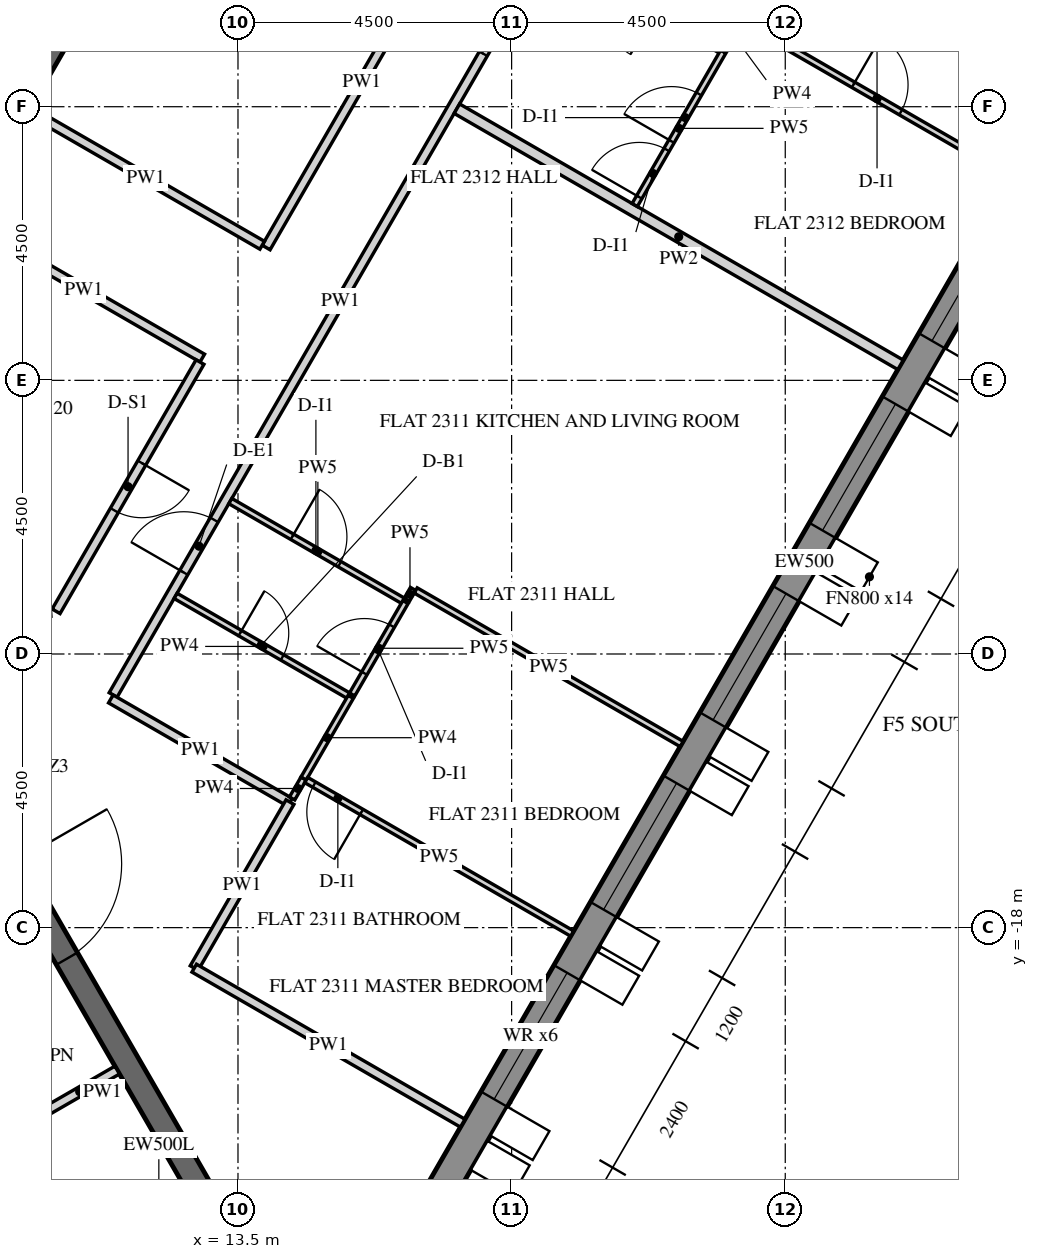
"""IFC4 building model, lengths in metres.
Left out: names, types, materials, properties, quantities, classifications, styles, units other than length and angle.
Written with IfcOpenShell. Run it as: python <this file> out.ifc"""

import sys

from ifc_helpers import new_model, si_unit, direction, frame, frame_2d, origin, place, context, subcontext, project, spatial, polyline, rectangle, outline, extrude, element, fill, save


model = new_model("IFC4")
c1 = context("Model", 3, precision=1e-05, world=origin(), true_north=direction((0.0, 1.0)))
c2 = subcontext(c1, "Body", "Model", "MODEL_VIEW")
j1 = project(units=[si_unit("LENGTHUNIT", "METRE"), si_unit("PLANEANGLEUNIT", "RADIAN")], contexts=[c1])
p1 = place(None, origin())
s1 = spatial("IfcSite", under=j1, at=p1, CompositionType="ELEMENT")
p2 = place(p1, origin())
s2 = spatial("IfcBuilding", under=s1, at=p2, CompositionType="ELEMENT")
p3 = place(p2, frame((0.0, 0.0, 291.3)))
s3 = spatial("IfcBuildingStorey", under=s2, at=p3, CompositionType="ELEMENT", Elevation=291.3)
p4 = place(p3, frame((16.451, -23.005, -0.15), z_axis=(0.0, 0.0, 1.0), x_axis=(0.500003737743, 0.866023245787, 0.0)))
e1 = element("IfcWall", 1, at=p4, inside=s3, PredefinedType="SOLIDWALL", context=c2, shape_type="SweptSolid", body=[
    extrude(outline(polyline([(-0.021, -0.25), (25.468, -0.25), (25.421, 0.25), (0.021, 0.25), (-0.021, -0.25)])), origin(), (0.0, 0.0, 1.0), 3.9),
])
p5 = place(p4, frame((2.522, 0.0, 0.75)))
e2 = element("IfcOpeningElement", 2, at=p5, cuts=e1, PredefinedType="OPENING", context=c2, shape_type="SweptSolid", body=[
    extrude(rectangle(XDim=2.4, YDim=2.7, at=frame_2d((1.2, 1.35))), frame((0.0, 0.26, 0.0), z_axis=(0.0, -1.0, 0.0), x_axis=(1.0, 0.0, 0.0)), (0.0, 0.0, 1.0), 0.52),
])
p6 = place(p4, frame((6.122, 0.0, 0.75)))
e3 = element("IfcOpeningElement", 3, at=p6, cuts=e1, PredefinedType="OPENING", context=c2, shape_type="SweptSolid", body=[
    extrude(rectangle(XDim=2.4, YDim=2.7, at=frame_2d((1.2, 1.35))), frame((0.0, 0.26, 0.0), z_axis=(0.0, -1.0, 0.0), x_axis=(1.0, 0.0, 0.0)), (0.0, 0.0, 1.0), 0.52),
])
p7 = place(p4, frame((9.722, 0.0, 0.75)))
e4 = element("IfcOpeningElement", 4, at=p7, cuts=e1, PredefinedType="OPENING", context=c2, shape_type="SweptSolid", body=[
    extrude(rectangle(XDim=2.4, YDim=2.7, at=frame_2d((1.2, 1.35))), frame((0.0, 0.26, 0.0), z_axis=(0.0, -1.0, 0.0), x_axis=(1.0, 0.0, 0.0)), (0.0, 0.0, 1.0), 0.52),
])
p8 = place(p4, frame((13.323, 0.0, 0.75)))
e5 = element("IfcOpeningElement", 5, at=p8, cuts=e1, PredefinedType="OPENING", context=c2, shape_type="SweptSolid", body=[
    extrude(rectangle(XDim=2.4, YDim=2.7, at=frame_2d((1.2, 1.35))), frame((0.0, 0.26, 0.0), z_axis=(0.0, -1.0, 0.0), x_axis=(1.0, 0.0, 0.0)), (0.0, 0.0, 1.0), 0.52),
])
p9 = place(p4, frame((16.922, 0.0, 0.75)))
e6 = element("IfcOpeningElement", 6, at=p9, cuts=e1, PredefinedType="OPENING", context=c2, shape_type="SweptSolid", body=[
    extrude(rectangle(XDim=2.4, YDim=2.7, at=frame_2d((1.2, 1.35))), frame((0.0, 0.26, 0.0), z_axis=(0.0, -1.0, 0.0), x_axis=(1.0, 0.0, 0.0)), (0.0, 0.0, 1.0), 0.52),
])
p10 = place(p4, frame((20.522, 0.0, 0.75)))
e7 = element("IfcOpeningElement", 7, at=p10, cuts=e1, PredefinedType="OPENING", context=c2, shape_type="SweptSolid", body=[
    extrude(rectangle(XDim=2.4, YDim=2.7, at=frame_2d((1.2, 1.35))), frame((0.0, 0.26, 0.0), z_axis=(0.0, -1.0, 0.0), x_axis=(1.0, 0.0, 0.0)), (0.0, 0.0, 1.0), 0.52),
])
p11 = place(p3, frame((6.235, -10.8, -0.15), z_axis=(0.0, 0.0, 1.0), x_axis=(0.499996419489, 0.866027470984, 0.0)))
e8 = element("IfcWall", 8, at=p11, inside=s3, PredefinedType="SHEAR", context=c2, shape_type="SweptSolid", body=[
    extrude(outline(polyline([(-0.115, -0.2), (12.586, -0.2), (12.355, 0.2), (0.115, 0.2), (-0.115, -0.2)])), origin(), (0.0, 0.0, 1.0), 3.9),
])
p12 = place(p11, frame((5.364, 0.0, 0.15)))
e9 = element("IfcOpeningElement", 9, at=p12, cuts=e8, PredefinedType="OPENING", context=c2, shape_type="SweptSolid", body=[
    extrude(rectangle(XDim=1.8, YDim=2.4, at=frame_2d((0.9, 1.2))), frame((0.0, 0.21, 0.0), z_axis=(0.0, -1.0, 0.0), x_axis=(1.0, 0.0, 0.0)), (0.0, 0.0, 1.0), 0.42),
])
p13 = place(p3, frame((6.351, -11.0, -0.15), z_axis=(0.0, 0.0, 1.0), x_axis=(0.499998894578, -0.866026041999, 0.0)))
e10 = element("IfcWall", 10, at=p13, inside=s3, PredefinedType="SHEAR", context=c2, shape_type="SweptSolid", body=[
    extrude(rectangle(XDim=15.544, YDim=0.4, at=frame_2d((7.772, 0.0))), origin(), (0.0, 0.0, 1.0), 3.9),
])
p14 = place(p13, frame((6.872, 0.0, 0.15)))
e11 = element("IfcOpeningElement", 11, at=p14, cuts=e10, PredefinedType="OPENING", context=c2, shape_type="SweptSolid", body=[
    extrude(rectangle(XDim=1.8, YDim=2.4, at=frame_2d((0.9, 1.2))), frame((0.0, 0.21, 0.0), z_axis=(0.0, -1.0, 0.0), x_axis=(1.0, 0.0, 0.0)), (0.0, 0.0, 1.0), 0.42),
])
p15 = place(p3, frame((10.28, -21.055, 0.0), z_axis=(0.0, 0.0, 1.0), x_axis=(0.866020080793, 0.500009219579, 0.0)))
e12 = element("IfcWall", 12, at=p15, inside=s3, PredefinedType="PARTITIONING", context=c2, shape_type="SweptSolid", body=[
    extrude(rectangle(XDim=1.425, YDim=0.15, at=frame_2d((0.712, 0.0))), origin(), (0.0, 0.0, 1.0), 2.988),
])
p16 = place(p3, frame((11.447, -14.174, 0.0), z_axis=(0.0, 0.0, 1.0), x_axis=(0.500003306199, 0.866023494941, 0.0)))
e13 = element("IfcWall", 13, at=p16, inside=s3, PredefinedType="PARTITIONING", context=c2, shape_type="SweptSolid", body=[
    extrude(rectangle(XDim=14.949, YDim=0.15, at=frame_2d((7.475, 0.0))), origin(), (0.0, 0.0, 1.0), 2.988),
])
p17 = place(p16, frame((2.325, 0.0, 0.0)))
e14 = element("IfcOpeningElement", 14, at=p17, cuts=e13, PredefinedType="OPENING", context=c2, shape_type="SweptSolid", body=[
    extrude(rectangle(XDim=1.0, YDim=2.1, at=frame_2d((0.5, 1.05))), frame((0.0, 0.085, 0.0), z_axis=(0.0, -1.0, 0.0), x_axis=(1.0, 0.0, 0.0)), (0.0, 0.0, 1.0), 0.17),
])
p18 = place(p16, frame((12.177, 0.0, 0.0)))
e15 = element("IfcOpeningElement", 15, at=p18, cuts=e13, PredefinedType="OPENING", context=c2, shape_type="SweptSolid", body=[
    extrude(rectangle(XDim=1.0, YDim=2.1, at=frame_2d((0.5, 1.05))), frame((0.0, 0.085, 0.0), z_axis=(0.0, -1.0, 0.0), x_axis=(1.0, 0.0, 0.0)), (0.0, 0.0, 1.0), 0.17),
])
p19 = place(p3, frame((14.354, -15.939, 0.0), z_axis=(0.0, 0.0, 1.0), x_axis=(-0.866020560687, 0.500008388397, 0.0)))
e16 = element("IfcWall", 16, at=p19, inside=s3, PredefinedType="PARTITIONING", context=c2, shape_type="SweptSolid", body=[
    extrude(rectangle(XDim=3.4, YDim=0.15, at=frame_2d((1.7, 0.0))), origin(), (0.0, 0.0, 1.0), 2.988),
])
p20 = place(p3, frame((12.78, -18.665, 0.0), z_axis=(0.0, 0.0, 1.0), x_axis=(0.499972881236, 0.866041060244, 0.0)))
e17 = element("IfcWall", 17, at=p20, inside=s3, PredefinedType="PARTITIONING", context=c2, shape_type="SweptSolid", body=[
    extrude(rectangle(XDim=3.151, YDim=0.15, at=frame_2d((1.575, 0.0))), origin(), (0.0, 0.0, 1.0), 2.988),
])
p21 = place(p3, frame((17.196, -21.216, 0.0), z_axis=(0.0, 0.0, 1.0), x_axis=(-0.866024511559, 0.500001545377, 0.0)))
e18 = element("IfcWall", 18, at=p21, inside=s3, PredefinedType="PARTITIONING", context=c2, shape_type="SweptSolid", body=[
    extrude(rectangle(XDim=5.099, YDim=0.15, at=frame_2d((2.549, 0.0))), origin(), (0.0, 0.0, 1.0), 2.988),
])
p22 = place(p3, frame((17.112, -1.362, 0.0), z_axis=(0.0, 0.0, 1.0), x_axis=(-0.49999985423, -0.866025487945, 0.0)))
e19 = element("IfcWall", 19, at=p22, inside=s3, PredefinedType="PARTITIONING", context=c2, shape_type="SweptSolid", body=[
    extrude(rectangle(XDim=6.298, YDim=0.15, at=frame_2d((3.149, 0.0))), origin(), (0.0, 0.0, 1.0), 2.988),
])
p23 = place(p3, frame((13.898, -6.778, 0.0), z_axis=(0.0, 0.0, 1.0), x_axis=(-0.866041342403, 0.499972392486, 0.0)))
e20 = element("IfcWall", 20, at=p23, inside=s3, PredefinedType="PARTITIONING", context=c2, shape_type="SweptSolid", body=[
    extrude(rectangle(XDim=4.425, YDim=0.15, at=frame_2d((2.212, 0.0))), origin(), (0.0, 0.0, 1.0), 2.988),
])
p24 = place(p3, frame((9.016, -6.384, 0.0), z_axis=(0.0, 0.0, 1.0), x_axis=(0.866031096941, -0.499990139034, 0.0)))
e21 = element("IfcWall", 21, at=p24, inside=s3, PredefinedType="PARTITIONING", context=c2, shape_type="SweptSolid", body=[
    extrude(rectangle(XDim=4.5, YDim=0.15, at=frame_2d((2.25, 0.0))), origin(), (0.0, 0.0, 1.0), 2.988),
])
p25 = place(p3, frame((12.875, -8.699, 0.0), z_axis=(0.0, 0.0, 1.0), x_axis=(-0.49999482868, -0.866028389427, 0.0)))
e22 = element("IfcWall", 22, at=p25, inside=s3, PredefinedType="PARTITIONING", context=c2, shape_type="SweptSolid", body=[
    extrude(rectangle(XDim=4.733, YDim=0.15, at=frame_2d((2.366, 0.0))), origin(), (0.0, 0.0, 1.0), 2.988),
])
p26 = place(p25, frame((1.917, 0.0, 0.0)))
e23 = element("IfcOpeningElement", 23, at=p26, cuts=e22, PredefinedType="OPENING", context=c2, shape_type="SweptSolid", body=[
    extrude(rectangle(XDim=0.9, YDim=2.1, at=frame_2d((0.45, 1.05))), frame((0.0, 0.085, 0.0), z_axis=(0.0, -1.0, 0.0), x_axis=(1.0, 0.0, 0.0)), (0.0, 0.0, 1.0), 0.17),
])
p27 = place(p3, frame((13.374, -10.985, 0.0), z_axis=(0.0, 0.0, 1.0), x_axis=(0.866020521143, -0.500008456887, 0.0)))
e24 = element("IfcWall", 24, at=p27, inside=s3, PredefinedType="PARTITIONING", context=c2, shape_type="SweptSolid", body=[
    extrude(rectangle(XDim=3.325, YDim=0.1, at=frame_2d((1.663, 0.0))), origin(), (0.0, 0.0, 1.0), 2.988),
])
p28 = place(p27, frame((1.175, 0.0, 0.0)))
e25 = element("IfcOpeningElement", 25, at=p28, cuts=e24, PredefinedType="OPENING", context=c2, shape_type="SweptSolid", body=[
    extrude(rectangle(XDim=0.9, YDim=2.1, at=frame_2d((0.45, 1.05))), frame((0.0, 0.06, 0.0), z_axis=(0.0, -1.0, 0.0), x_axis=(1.0, 0.0, 0.0)), (0.0, 0.0, 1.0), 0.12),
])
p29 = place(p3, frame((16.278, -12.606, 0.0), z_axis=(0.0, 0.0, 1.0), x_axis=(0.500137716533, 0.865945878506, 0.0)))
e26 = element("IfcWall", 26, at=p29, inside=s3, PredefinedType="PARTITIONING", context=c2, shape_type="SweptSolid", body=[
    extrude(rectangle(XDim=0.204, YDim=0.1, at=frame_2d((0.102, 0.0))), origin(), (0.0, 0.0, 1.0), 2.988),
])
p30 = place(p3, frame((16.423, -12.455, 0.0), z_axis=(0.0, 0.0, 1.0), x_axis=(0.866018134068, -0.500012591307, 0.0)))
e27 = element("IfcWall", 27, at=p30, inside=s3, PredefinedType="PARTITIONING", context=c2, shape_type="SweptSolid", body=[
    extrude(rectangle(XDim=5.05, YDim=0.1, at=frame_2d((2.525, 0.0))), origin(), (0.0, 0.0, 1.0), 2.988),
])
p31 = place(p3, frame((24.396, -8.745, 0.0), z_axis=(0.0, 0.0, 1.0), x_axis=(-0.866014270972, 0.500019282102, 0.0)))
e28 = element("IfcWall", 28, at=p31, inside=s3, PredefinedType="PARTITIONING", context=c2, shape_type="SweptSolid", body=[
    extrude(rectangle(XDim=8.425, YDim=0.18, at=frame_2d((4.212, 0.0))), origin(), (0.0, 0.0, 1.0), 2.988),
])
p32 = place(p3, frame((12.474, -12.544, 0.0), z_axis=(0.0, 0.0, 1.0), x_axis=(0.866002163101, -0.500040251884, 0.0)))
e29 = element("IfcWall", 29, at=p32, inside=s3, PredefinedType="PARTITIONING", context=c2, shape_type="SweptSolid", body=[
    extrude(rectangle(XDim=3.325, YDim=0.1, at=frame_2d((1.663, 0.0))), origin(), (0.0, 0.0, 1.0), 2.988),
])
p33 = place(p32, frame((1.225, 0.0, 0.0)))
e30 = element("IfcOpeningElement", 30, at=p33, cuts=e29, PredefinedType="OPENING", context=c2, shape_type="SweptSolid", body=[
    extrude(rectangle(XDim=0.8, YDim=2.1, at=frame_2d((0.4, 1.05))), frame((0.0, 0.06, 0.0), z_axis=(0.0, -1.0, 0.0), x_axis=(1.0, 0.0, 0.0)), (0.0, 0.0, 1.0), 0.12),
])
p34 = place(p3, frame((15.378, -14.165, 0.0), z_axis=(0.0, 0.0, 1.0), x_axis=(0.499971461383, 0.866041879935, 0.0)))
e31 = element("IfcWall", 31, at=p34, inside=s3, PredefinedType="PARTITIONING", context=c2, shape_type="SweptSolid", body=[
    extrude(rectangle(XDim=1.754, YDim=0.1, at=frame_2d((0.877, 0.0))), origin(), (0.0, 0.0, 1.0), 2.988),
])
p35 = place(p34, frame((0.402, 0.0, 0.0)))
e32 = element("IfcOpeningElement", 32, at=p35, cuts=e31, PredefinedType="OPENING", context=c2, shape_type="SweptSolid", body=[
    extrude(rectangle(XDim=0.9, YDim=2.1, at=frame_2d((0.45, 1.05))), frame((0.0, 0.06, 0.0), z_axis=(0.0, -1.0, 0.0), x_axis=(1.0, 0.0, 0.0)), (0.0, 0.0, 1.0), 0.12),
])
p36 = place(p3, frame((14.39, -15.875, 0.0), z_axis=(0.0, 0.0, 1.0), x_axis=(0.500094824054, 0.865970650169, 0.0)))
e33 = element("IfcWall", 33, at=p36, inside=s3, PredefinedType="PARTITIONING", context=c2, shape_type="SweptSolid", body=[
    extrude(rectangle(XDim=0.378, YDim=0.1, at=frame_2d((0.189, 0.0))), origin(), (0.0, 0.0, 1.0), 2.988),
])
p37 = place(p3, frame((14.579, -15.548, 0.0), z_axis=(0.0, 0.0, 1.0), x_axis=(0.499949632511, 0.866054481515, 0.0)))
e34 = element("IfcWall", 34, at=p37, inside=s3, PredefinedType="PARTITIONING", context=c2, shape_type="SweptSolid", body=[
    extrude(rectangle(XDim=1.551, YDim=0.1, at=frame_2d((0.775, 0.0))), origin(), (0.0, 0.0, 1.0), 2.988),
])
p38 = place(p3, frame((18.996, -18.098, 0.0), z_axis=(0.0, 0.0, 1.0), x_axis=(-0.866039067339, 0.499976333282, 0.0)))
e35 = element("IfcWall", 35, at=p38, inside=s3, PredefinedType="PARTITIONING", context=c2, shape_type="SweptSolid", body=[
    extrude(rectangle(XDim=5.05, YDim=0.1, at=frame_2d((2.525, 0.0))), origin(), (0.0, 0.0, 1.0), 2.988),
])
p39 = place(p38, frame((4.0, 0.0, 0.0)))
e36 = element("IfcOpeningElement", 36, at=p39, cuts=e35, PredefinedType="OPENING", context=c2, shape_type="SweptSolid", body=[
    extrude(rectangle(XDim=0.9, YDim=2.1, at=frame_2d((0.45, 1.05))), frame((0.0, 0.06, 0.0), z_axis=(0.0, -1.0, 0.0), x_axis=(1.0, 0.0, 0.0)), (0.0, 0.0, 1.0), 0.12),
])
p40 = place(p3, frame((21.823, -3.102, 0.0), z_axis=(0.0, 0.0, 1.0), x_axis=(0.866018134068, -0.500012591307, 0.0)))
e37 = element("IfcWall", 37, at=p40, inside=s3, PredefinedType="PARTITIONING", context=c2, shape_type="SweptSolid", body=[
    extrude(rectangle(XDim=5.05, YDim=0.1, at=frame_2d((2.525, 0.0))), origin(), (0.0, 0.0, 1.0), 2.988),
])
p41 = place(p40, frame((2.075, 0.0, 0.0)))
e38 = element("IfcOpeningElement", 38, at=p41, cuts=e37, PredefinedType="OPENING", context=c2, shape_type="SweptSolid", body=[
    extrude(rectangle(XDim=0.9, YDim=2.1, at=frame_2d((0.45, 1.05))), frame((0.0, 0.06, 0.0), z_axis=(0.0, -1.0, 0.0), x_axis=(1.0, 0.0, 0.0)), (0.0, 0.0, 1.0), 0.12),
])
p42 = place(p3, frame((21.479, -3.597, 0.0), z_axis=(0.0, 0.0, 1.0), x_axis=(-0.866033959199, 0.499985181294, 0.0)))
e39 = element("IfcWall", 39, at=p42, inside=s3, PredefinedType="PARTITIONING", context=c2, shape_type="SweptSolid", body=[
    extrude(rectangle(XDim=3.325, YDim=0.1, at=frame_2d((1.662, 0.0))), origin(), (0.0, 0.0, 1.0), 2.988),
])
p43 = place(p42, frame((1.3, 0.0, 0.0)))
e40 = element("IfcOpeningElement", 40, at=p43, cuts=e39, PredefinedType="OPENING", context=c2, shape_type="SweptSolid", body=[
    extrude(rectangle(XDim=0.8, YDim=2.1, at=frame_2d((0.4, 1.05))), frame((0.0, 0.06, 0.0), z_axis=(0.0, -1.0, 0.0), x_axis=(1.0, 0.0, 0.0)), (0.0, 0.0, 1.0), 0.12),
])
p44 = place(p3, frame((20.024, -6.117, 0.0), z_axis=(0.0, 0.0, 1.0), x_axis=(0.499935340648, 0.866062731661, 0.0)))
e41 = element("IfcWall", 41, at=p44, inside=s3, PredefinedType="PARTITIONING", context=c2, shape_type="SweptSolid", body=[
    extrude(rectangle(XDim=2.912, YDim=0.1, at=frame_2d((1.456, 0.0))), origin(), (0.0, 0.0, 1.0), 2.988),
])
p45 = place(p44, frame((0.15, 0.0, 0.0)))
e42 = element("IfcOpeningElement", 42, at=p45, cuts=e41, PredefinedType="OPENING", context=c2, shape_type="SweptSolid", body=[
    extrude(rectangle(XDim=0.9, YDim=2.1, at=frame_2d((0.45, 1.05))), frame((0.0, 0.06, 0.0), z_axis=(0.0, -1.0, 0.0), x_axis=(1.0, 0.0, 0.0)), (0.0, 0.0, 1.0), 0.12),
])
p46 = place(p44, frame((1.21, 0.0, 0.0)))
e43 = element("IfcOpeningElement", 43, at=p46, cuts=e41, PredefinedType="OPENING", context=c2, shape_type="SweptSolid", body=[
    extrude(rectangle(XDim=0.9, YDim=2.1, at=frame_2d((0.45, 1.05))), frame((0.0, 0.06, 0.0), z_axis=(0.0, -1.0, 0.0), x_axis=(1.0, 0.0, 0.0)), (0.0, 0.0, 1.0), 0.12),
])
p47 = place(p5, frame((0.0, 0.18, 0.0)))
e44 = element("IfcWindow", 44, at=p47, inside=s3, PartitioningType="DOUBLE_PANEL_VERTICAL", PredefinedType="WINDOW", context=c2, shape_type="SweptSolid", body=[
    extrude(rectangle(XDim=2.4, YDim=2.7, at=frame_2d((1.2, 1.35))), frame((0.0, 0.03, 0.0), z_axis=(0.0, -1.0, 0.0), x_axis=(1.0, 0.0, 0.0)), (0.0, 0.0, 1.0), 0.06),
])
fill(e2, e44)
p48 = place(p6, frame((0.0, 0.18, 0.0)))
e45 = element("IfcWindow", 45, at=p48, inside=s3, PartitioningType="DOUBLE_PANEL_VERTICAL", PredefinedType="WINDOW", context=c2, shape_type="SweptSolid", body=[
    extrude(rectangle(XDim=2.4, YDim=2.7, at=frame_2d((1.2, 1.35))), frame((0.0, 0.03, 0.0), z_axis=(0.0, -1.0, 0.0), x_axis=(1.0, 0.0, 0.0)), (0.0, 0.0, 1.0), 0.06),
])
fill(e3, e45)
p49 = place(p7, frame((0.0, 0.18, 0.0)))
e46 = element("IfcWindow", 46, at=p49, inside=s3, PartitioningType="DOUBLE_PANEL_VERTICAL", PredefinedType="WINDOW", context=c2, shape_type="SweptSolid", body=[
    extrude(rectangle(XDim=2.4, YDim=2.7, at=frame_2d((1.2, 1.35))), frame((0.0, 0.03, 0.0), z_axis=(0.0, -1.0, 0.0), x_axis=(1.0, 0.0, 0.0)), (0.0, 0.0, 1.0), 0.06),
])
fill(e4, e46)
p50 = place(p8, frame((0.0, 0.18, 0.0)))
e47 = element("IfcWindow", 47, at=p50, inside=s3, PartitioningType="DOUBLE_PANEL_VERTICAL", PredefinedType="WINDOW", context=c2, shape_type="SweptSolid", body=[
    extrude(rectangle(XDim=2.4, YDim=2.7, at=frame_2d((1.2, 1.35))), frame((0.0, 0.03, 0.0), z_axis=(0.0, -1.0, 0.0), x_axis=(1.0, 0.0, 0.0)), (0.0, 0.0, 1.0), 0.06),
])
fill(e5, e47)
p51 = place(p9, frame((0.0, 0.18, 0.0)))
e48 = element("IfcWindow", 48, at=p51, inside=s3, PartitioningType="DOUBLE_PANEL_VERTICAL", PredefinedType="WINDOW", context=c2, shape_type="SweptSolid", body=[
    extrude(rectangle(XDim=2.4, YDim=2.7, at=frame_2d((1.2, 1.35))), frame((0.0, 0.03, 0.0), z_axis=(0.0, -1.0, 0.0), x_axis=(1.0, 0.0, 0.0)), (0.0, 0.0, 1.0), 0.06),
])
fill(e6, e48)
p52 = place(p14, origin())
e49 = element("IfcDoor", 49, at=p52, inside=s3, OperationType="DOUBLE_DOOR_SINGLE_SWING", PredefinedType="DOOR", context=c2, shape_type="SweptSolid", body=[
    extrude(rectangle(XDim=1.8, YDim=2.4, at=frame_2d((0.9, 1.2))), frame((0.0, 0.025, 0.0), z_axis=(0.0, -1.0, 0.0), x_axis=(1.0, 0.0, 0.0)), (0.0, 0.0, 1.0), 0.05),
])
fill(e11, e49)
p53 = place(p17, origin())
e50 = element("IfcDoor", 50, at=p53, inside=s3, OperationType="SINGLE_SWING_LEFT", PredefinedType="DOOR", context=c2, shape_type="SweptSolid", body=[
    extrude(rectangle(XDim=1.0, YDim=2.1, at=frame_2d((0.5, 1.05))), frame((0.0, 0.025, 0.0), z_axis=(0.0, -1.0, 0.0), x_axis=(1.0, 0.0, 0.0)), (0.0, 0.0, 1.0), 0.05),
])
fill(e14, e50)
p54 = place(p33, origin())
e51 = element("IfcDoor", 51, at=p54, inside=s3, OperationType="SINGLE_SWING_RIGHT", PredefinedType="DOOR", context=c2, shape_type="SweptSolid", body=[
    extrude(rectangle(XDim=0.8, YDim=2.1, at=frame_2d((0.4, 1.05))), frame((0.0, 0.025, 0.0), z_axis=(0.0, -1.0, 0.0), x_axis=(1.0, 0.0, 0.0)), (0.0, 0.0, 1.0), 0.05),
])
fill(e30, e51)
p55 = place(p28, origin())
e52 = element("IfcDoor", 52, at=p55, inside=s3, OperationType="SINGLE_SWING_RIGHT", PredefinedType="DOOR", context=c2, shape_type="SweptSolid", body=[
    extrude(rectangle(XDim=0.9, YDim=2.1, at=frame_2d((0.45, 1.05))), frame((0.0, 0.025, 0.0), z_axis=(0.0, -1.0, 0.0), x_axis=(1.0, 0.0, 0.0)), (0.0, 0.0, 1.0), 0.05),
])
fill(e25, e52)
p56 = place(p39, origin())
e53 = element("IfcDoor", 53, at=p56, inside=s3, OperationType="SINGLE_SWING_RIGHT", PredefinedType="DOOR", context=c2, shape_type="SweptSolid", body=[
    extrude(rectangle(XDim=0.9, YDim=2.1, at=frame_2d((0.45, 1.05))), frame((0.0, 0.025, 0.0), z_axis=(0.0, -1.0, 0.0), x_axis=(1.0, 0.0, 0.0)), (0.0, 0.0, 1.0), 0.05),
])
fill(e36, e53)
p57 = place(p35, origin())
e54 = element("IfcDoor", 54, at=p57, inside=s3, OperationType="SINGLE_SWING_RIGHT", PredefinedType="DOOR", context=c2, shape_type="SweptSolid", body=[
    extrude(rectangle(XDim=0.9, YDim=2.1, at=frame_2d((0.45, 1.05))), frame((0.0, 0.025, 0.0), z_axis=(0.0, -1.0, 0.0), x_axis=(1.0, 0.0, 0.0)), (0.0, 0.0, 1.0), 0.05),
])
fill(e32, e54)
p58 = place(p18, origin())
e55 = element("IfcDoor", 55, at=p58, inside=s3, OperationType="SINGLE_SWING_LEFT", PredefinedType="DOOR", context=c2, shape_type="SweptSolid", body=[
    extrude(rectangle(XDim=1.0, YDim=2.1, at=frame_2d((0.5, 1.05))), frame((0.0, 0.025, 0.0), z_axis=(0.0, -1.0, 0.0), x_axis=(1.0, 0.0, 0.0)), (0.0, 0.0, 1.0), 0.05),
])
fill(e15, e55)
p59 = place(p45, origin())
e56 = element("IfcDoor", 56, at=p59, inside=s3, OperationType="SINGLE_SWING_LEFT", PredefinedType="DOOR", context=c2, shape_type="SweptSolid", body=[
    extrude(rectangle(XDim=0.9, YDim=2.1, at=frame_2d((0.45, 1.05))), frame((0.0, 0.025, 0.0), z_axis=(0.0, -1.0, 0.0), x_axis=(1.0, 0.0, 0.0)), (0.0, 0.0, 1.0), 0.05),
])
fill(e42, e56)
p60 = place(p46, origin())
e57 = element("IfcDoor", 57, at=p60, inside=s3, OperationType="SINGLE_SWING_LEFT", PredefinedType="DOOR", context=c2, shape_type="SweptSolid", body=[
    extrude(rectangle(XDim=0.9, YDim=2.1, at=frame_2d((0.45, 1.05))), frame((0.0, 0.025, 0.0), z_axis=(0.0, -1.0, 0.0), x_axis=(1.0, 0.0, 0.0)), (0.0, 0.0, 1.0), 0.05),
])
fill(e43, e57)
p61 = place(p41, origin())
e58 = element("IfcDoor", 58, at=p61, inside=s3, OperationType="SINGLE_SWING_RIGHT", PredefinedType="DOOR", context=c2, shape_type="SweptSolid", body=[
    extrude(rectangle(XDim=0.9, YDim=2.1, at=frame_2d((0.45, 1.05))), frame((0.0, 0.025, 0.0), z_axis=(0.0, -1.0, 0.0), x_axis=(1.0, 0.0, 0.0)), (0.0, 0.0, 1.0), 0.05),
])
fill(e38, e58)
p62 = place(p26, origin())
e59 = element("IfcDoor", 59, at=p62, inside=s3, OperationType="SINGLE_SWING_LEFT", PredefinedType="DOOR", context=c2, shape_type="SweptSolid", body=[
    extrude(rectangle(XDim=0.9, YDim=2.1, at=frame_2d((0.45, 1.05))), frame((0.0, 0.025, 0.0), z_axis=(0.0, -1.0, 0.0), x_axis=(1.0, 0.0, 0.0)), (0.0, 0.0, 1.0), 0.05),
])
fill(e23, e59)
save(model, sys.argv[1])
